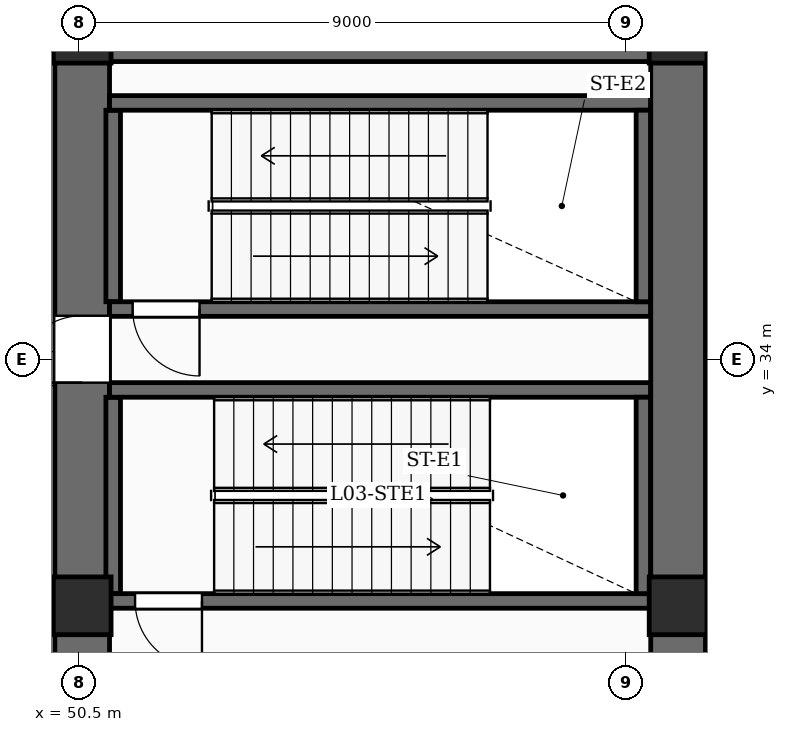
"""IFC4 building model, lengths in metres.
Left out: names, types, materials, properties, quantities, classifications, styles, units other than length and angle.
Written with IfcOpenShell. Run it as: python <this file> out.ifc"""

import sys

from ifc_helpers import new_model, si_unit, direction, frame, frame_2d, origin, origin_2d, place, context, subcontext, project, spatial, rectangle, extrude, element, fill, save


model = new_model("IFC4")
c1 = context("Model", 3, precision=1e-05, world=origin(), true_north=direction((0.0, 1.0)))
c2 = subcontext(c1, "Body", "Model", "MODEL_VIEW")
j1 = project(units=[si_unit("LENGTHUNIT", "METRE"), si_unit("PLANEANGLEUNIT", "RADIAN")], contexts=[c1])
p1 = place(None, origin())
s1 = spatial("IfcSite", under=j1, at=p1, CompositionType="ELEMENT")
p2 = place(p1, origin())
s2 = spatial("IfcBuilding", under=s1, at=p2, CompositionType="ELEMENT")
p3 = place(p2, frame((0.0, 0.0, 18.0)))
s3 = spatial("IfcBuildingStorey", under=s2, at=p3, CompositionType="ELEMENT", Elevation=18.0)
p4 = place(p3, frame((50.55, 19.0, -0.35), z_axis=(0.0, 0.0, 1.0), x_axis=(0.0, 1.0, 0.0)))
e1 = element("IfcWall", 1, at=p4, inside=s3, PredefinedType="SHEAR", context=c2, shape_type="SweptSolid", body=[
    extrude(rectangle(XDim=20.8, YDim=0.9, at=frame_2d((10.4, 0.0))), origin(), (0.0, 0.0, 1.0), 5.0),
])
p5 = place(p4, frame((2.5, 0.0, 0.35)))
e2 = element("IfcOpeningElement", 2, at=p5, cuts=e1, PredefinedType="OPENING", context=c2, shape_type="SweptSolid", body=[
    extrude(rectangle(XDim=1.05, YDim=2.15, at=frame_2d((0.525, 1.075))), frame((0.0, 0.46, 0.0), z_axis=(0.0, -1.0, 0.0), x_axis=(1.0, 0.0, 0.0)), (0.0, 0.0, 1.0), 0.92),
])
p6 = place(p4, frame((8.65, 0.0, 0.35)))
e3 = element("IfcOpeningElement", 3, at=p6, cuts=e1, PredefinedType="OPENING", context=c2, shape_type="SweptSolid", body=[
    extrude(rectangle(XDim=1.05, YDim=2.15, at=frame_2d((0.525, 1.075))), frame((0.0, 0.46, 0.0), z_axis=(0.0, -1.0, 0.0), x_axis=(1.0, 0.0, 0.0)), (0.0, 0.0, 1.0), 0.92),
])
p7 = place(p4, frame((14.62, 0.0, 0.35)))
e4 = element("IfcOpeningElement", 4, at=p7, cuts=e1, PredefinedType="OPENING", context=c2, shape_type="SweptSolid", body=[
    extrude(rectangle(XDim=1.1, YDim=2.15, at=frame_2d((0.55, 1.075))), frame((0.0, 0.46, 0.0), z_axis=(0.0, -1.0, 0.0), x_axis=(1.0, 0.0, 0.0)), (0.0, 0.0, 1.0), 0.92),
])
p8 = place(p3, frame((60.35, 19.0, -0.35), z_axis=(0.0, 0.0, 1.0), x_axis=(0.0, 1.0, 0.0)))
e5 = element("IfcWall", 5, at=p8, inside=s3, PredefinedType="SHEAR", context=c2, shape_type="SweptSolid", body=[
    extrude(rectangle(XDim=20.8, YDim=0.9, at=frame_2d((10.4, 0.0))), origin(), (0.0, 0.0, 1.0), 5.0),
])
p9 = place(p3, frame((51.0, 39.35, -0.35), z_axis=(0.0, 0.0, 1.0), x_axis=(1.0, 0.0, 0.0)))
e6 = element("IfcWall", 6, at=p9, inside=s3, PredefinedType="SHEAR", context=c2, shape_type="SweptSolid", body=[
    extrude(rectangle(XDim=8.9, YDim=0.9, at=frame_2d((4.45, 0.0))), origin(), (0.0, 0.0, 1.0), 5.0),
])
for number, where, z_axis, x_axis in (
    (7, (50.55, 29.95, -0.35), (0.0, 0.0, 1.0), (1.0, 0.0, 0.0)),
    (8, (60.35, 29.95, -0.35), (0.0, 0.0, 1.0), (1.0, 0.0, 0.0)),
    (9, (50.55, 39.35, -0.35), (0.0, 0.0, 1.0), (1.0, 0.0, 0.0)),
    (10, (60.35, 39.35, -0.35), (0.0, 0.0, 1.0), (1.0, 0.0, 0.0)),
):
    element("IfcColumn", number, at=place(p3, frame(where, z_axis=z_axis, x_axis=x_axis)), inside=s3, PredefinedType="COLUMN", context=c2, shape_type="SweptSolid", body=[
        extrude(rectangle(XDim=0.95, YDim=0.95, at=origin_2d()), origin(), (0.0, 0.0, 1.0), 5.0),
    ])
p10 = place(p3, frame((59.9, 30.03, 0.0), z_axis=(0.0, 0.0, 1.0), x_axis=(-1.0, 0.0, 0.0)))
e11 = element("IfcWall", 11, at=p10, inside=s3, PredefinedType="SOLIDWALL", context=c2, shape_type="SweptSolid", body=[
    extrude(rectangle(XDim=8.9, YDim=0.24, at=frame_2d((4.45, 0.0))), origin(), (0.0, 0.0, 1.0), 4.65),
])
p11 = place(p10, frame((7.38, 0.0, 0.0)))
e12 = element("IfcOpeningElement", 12, at=p11, cuts=e11, PredefinedType="OPENING", context=c2, shape_type="SweptSolid", body=[
    extrude(rectangle(XDim=1.1, YDim=2.15, at=frame_2d((0.55, 1.075))), frame((0.0, 0.13, 0.0), z_axis=(0.0, -1.0, 0.0), x_axis=(1.0, 0.0, 0.0)), (0.0, 0.0, 1.0), 0.26),
])
p12 = place(p3, frame((51.0, 33.5, 0.0), z_axis=(0.0, 0.0, 1.0), x_axis=(1.0, 0.0, 0.0)))
e13 = element("IfcWall", 13, at=p12, inside=s3, PredefinedType="SOLIDWALL", context=c2, shape_type="SweptSolid", body=[
    extrude(rectangle(XDim=8.9, YDim=0.24, at=frame_2d((4.45, 0.0))), origin(), (0.0, 0.0, 1.0), 4.65),
])
for number, where, z_axis, x_axis in (
    (14, (51.06, 30.15, 0.0), (0.0, 0.0, 1.0), (0.0, 1.0, 0.0)),
    (15, (59.78, 30.15, 0.0), (0.0, 0.0, 1.0), (0.0, 1.0, 0.0)),
):
    element("IfcWall", number, at=place(p3, frame(where, z_axis=z_axis, x_axis=x_axis)), inside=s3, PredefinedType="SOLIDWALL", context=c2, shape_type="SweptSolid", body=[
        extrude(rectangle(XDim=3.23, YDim=0.24, at=frame_2d((1.615, 0.0))), origin(), (0.0, 0.0, 1.0), 4.65),
    ])
p13 = place(p3, frame((59.9, 34.83, 0.0), z_axis=(0.0, 0.0, 1.0), x_axis=(-1.0, 0.0, 0.0)))
e16 = element("IfcWall", 16, at=p13, inside=s3, PredefinedType="SOLIDWALL", context=c2, shape_type="SweptSolid", body=[
    extrude(rectangle(XDim=8.9, YDim=0.24, at=frame_2d((4.45, 0.0))), origin(), (0.0, 0.0, 1.0), 4.65),
])
p14 = place(p13, frame((7.42, 0.0, 0.0)))
e17 = element("IfcOpeningElement", 17, at=p14, cuts=e16, PredefinedType="OPENING", context=c2, shape_type="SweptSolid", body=[
    extrude(rectangle(XDim=1.1, YDim=2.15, at=frame_2d((0.55, 1.075))), frame((0.0, 0.13, 0.0), z_axis=(0.0, -1.0, 0.0), x_axis=(1.0, 0.0, 0.0)), (0.0, 0.0, 1.0), 0.26),
])
p15 = place(p3, frame((51.0, 38.22, 0.0), z_axis=(0.0, 0.0, 1.0), x_axis=(1.0, 0.0, 0.0)))
e18 = element("IfcWall", 18, at=p15, inside=s3, PredefinedType="SOLIDWALL", context=c2, shape_type="SweptSolid", body=[
    extrude(rectangle(XDim=8.9, YDim=0.24, at=frame_2d((4.45, 0.0))), origin(), (0.0, 0.0, 1.0), 4.65),
])
for number, where, z_axis, x_axis in (
    (19, (51.06, 34.95, 0.0), (0.0, 0.0, 1.0), (0.0, 1.0, 0.0)),
    (20, (59.78, 34.95, 0.0), (0.0, 0.0, 1.0), (0.0, 1.0, 0.0)),
):
    element("IfcWall", number, at=place(p3, frame(where, z_axis=z_axis, x_axis=x_axis)), inside=s3, PredefinedType="SOLIDWALL", context=c2, shape_type="SweptSolid", body=[
        extrude(rectangle(XDim=3.15, YDim=0.24, at=frame_2d((1.575, 0.0))), origin(), (0.0, 0.0, 1.0), 4.65),
    ])
p16 = place(p7, origin())
e21 = element("IfcDoor", 21, at=p16, inside=s3, OperationType="SINGLE_SWING_LEFT", PredefinedType="DOOR", context=c2, shape_type="SweptSolid", body=[
    extrude(rectangle(XDim=1.1, YDim=2.15, at=frame_2d((0.55, 1.075))), frame((0.0, 0.025, 0.0), z_axis=(0.0, -1.0, 0.0), x_axis=(1.0, 0.0, 0.0)), (0.0, 0.0, 1.0), 0.05),
])
fill(e4, e21)
p17 = place(p11, origin())
e22 = element("IfcDoor", 22, at=p17, inside=s3, OperationType="SINGLE_SWING_LEFT", PredefinedType="DOOR", context=c2, shape_type="SweptSolid", body=[
    extrude(rectangle(XDim=1.1, YDim=2.15, at=frame_2d((0.55, 1.075))), frame((0.0, 0.025, 0.0), z_axis=(0.0, -1.0, 0.0), x_axis=(1.0, 0.0, 0.0)), (0.0, 0.0, 1.0), 0.05),
])
fill(e12, e22)
p18 = place(p14, origin())
e23 = element("IfcDoor", 23, at=p18, inside=s3, OperationType="SINGLE_SWING_LEFT", PredefinedType="DOOR", context=c2, shape_type="SweptSolid", body=[
    extrude(rectangle(XDim=1.1, YDim=2.15, at=frame_2d((0.55, 1.075))), frame((0.0, 0.025, 0.0), z_axis=(0.0, -1.0, 0.0), x_axis=(1.0, 0.0, 0.0)), (0.0, 0.0, 1.0), 0.05),
])
fill(e17, e23)
save(model, sys.argv[1])
